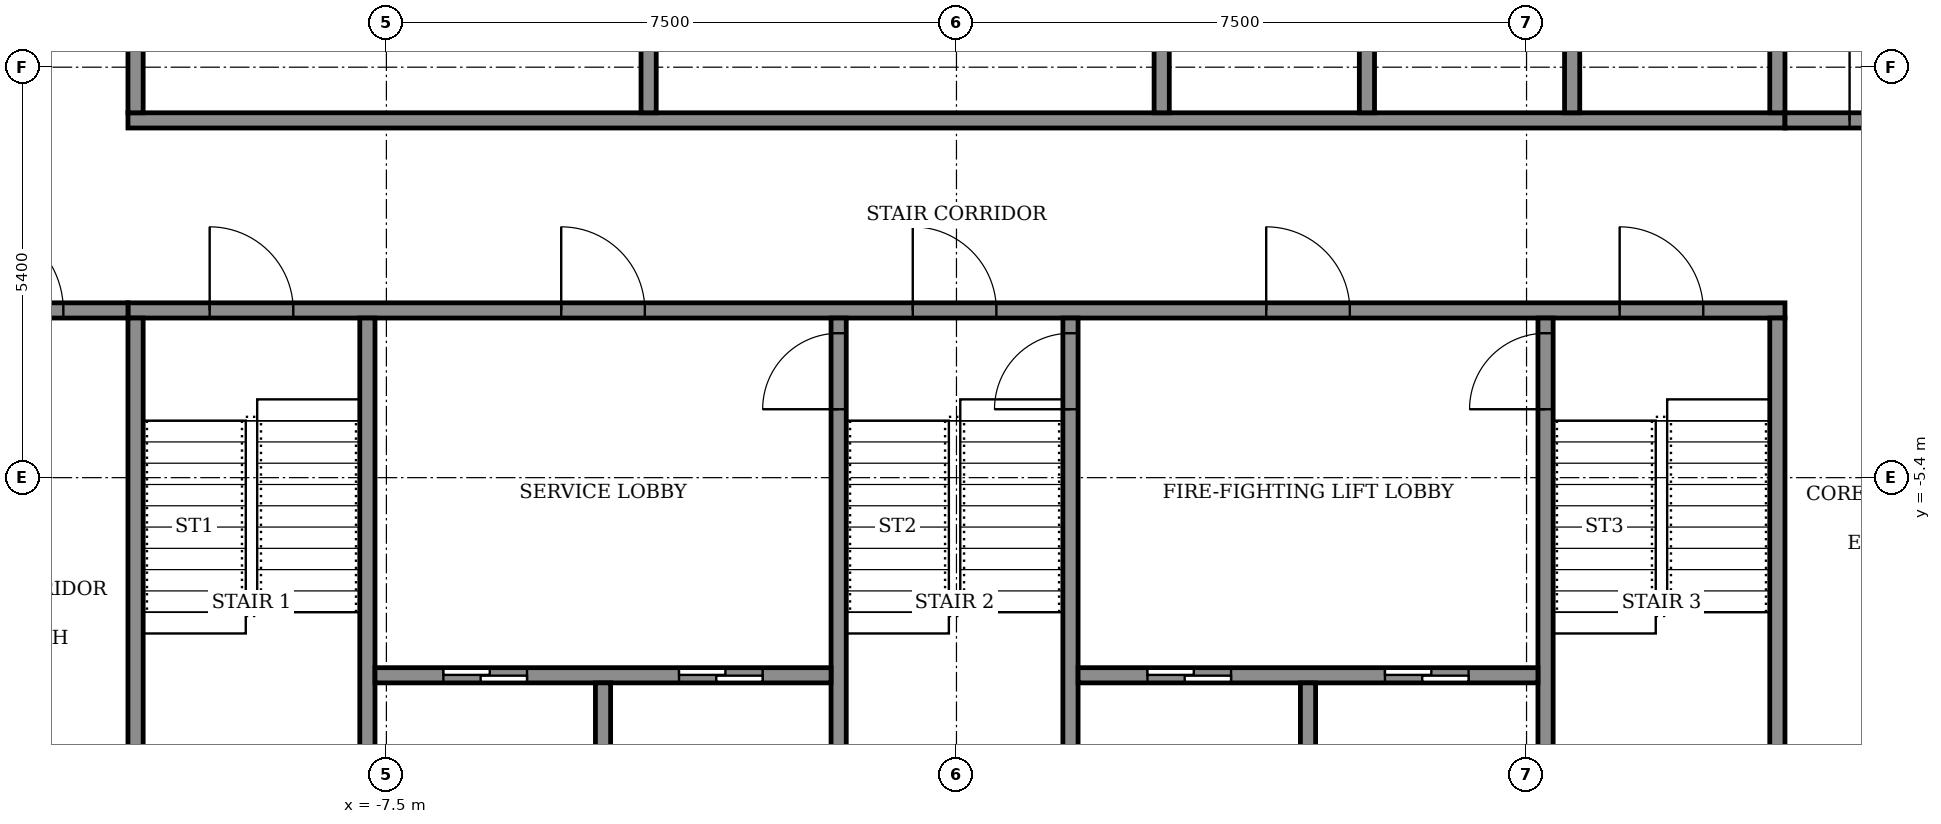
"""IFC4 building model, lengths in metres.
Left out: names, types, materials, properties, quantities, classifications, styles, units other than length and angle.
Written with IfcOpenShell. Run it as: python <this file> out.ifc"""

import sys

from ifc_helpers import new_model, si_unit, direction, frame, frame_2d, origin, place, context, subcontext, project, spatial, rectangle, extrude, element, fill, save


model = new_model("IFC4")
c1 = context("Model", 3, precision=1e-05, world=origin(), true_north=direction((0.0, 1.0)))
c2 = subcontext(c1, "Body", "Model", "MODEL_VIEW")
j1 = project(units=[si_unit("LENGTHUNIT", "METRE"), si_unit("PLANEANGLEUNIT", "RADIAN")], contexts=[c1])
p1 = place(None, origin())
s1 = spatial("IfcSite", under=j1, at=p1, CompositionType="ELEMENT")
p2 = place(p1, origin())
s2 = spatial("IfcBuilding", under=s1, at=p2, CompositionType="ELEMENT")
p3 = place(p2, frame((0.0, 0.0, 189.7)))
s3 = spatial("IfcBuildingStorey", under=s2, at=p3, CompositionType="ELEMENT", Elevation=189.7)
p4 = place(p3, frame((-10.9, -3.2, 0.0), z_axis=(0.0, 0.0, 1.0), x_axis=(1.0, 0.0, 0.0)))
e1 = element("IfcWall", 1, at=p4, inside=s3, PredefinedType="SHEAR", context=c2, shape_type="SweptSolid", body=[
    extrude(rectangle(XDim=21.8, YDim=0.2, at=frame_2d((10.9, 0.0))), origin(), (0.0, 0.0, 1.0), 3.05),
])
p5 = place(p4, frame((1.075, 0.0, 0.0)))
e2 = element("IfcOpeningElement", 2, at=p5, cuts=e1, PredefinedType="OPENING", context=c2, shape_type="SweptSolid", body=[
    extrude(rectangle(XDim=1.1, YDim=2.1, at=frame_2d((0.55, 1.05))), frame((0.0, 0.11, 0.0), z_axis=(0.0, -1.0, 0.0), x_axis=(1.0, 0.0, 0.0)), (0.0, 0.0, 1.0), 0.22),
])
p6 = place(p4, frame((10.325, 0.0, 0.0)))
e3 = element("IfcOpeningElement", 3, at=p6, cuts=e1, PredefinedType="OPENING", context=c2, shape_type="SweptSolid", body=[
    extrude(rectangle(XDim=1.1, YDim=2.1, at=frame_2d((0.55, 1.05))), frame((0.0, 0.11, 0.0), z_axis=(0.0, -1.0, 0.0), x_axis=(1.0, 0.0, 0.0)), (0.0, 0.0, 1.0), 0.22),
])
p7 = place(p4, frame((19.625, 0.0, 0.0)))
e4 = element("IfcOpeningElement", 4, at=p7, cuts=e1, PredefinedType="OPENING", context=c2, shape_type="SweptSolid", body=[
    extrude(rectangle(XDim=1.1, YDim=2.1, at=frame_2d((0.55, 1.05))), frame((0.0, 0.11, 0.0), z_axis=(0.0, -1.0, 0.0), x_axis=(1.0, 0.0, 0.0)), (0.0, 0.0, 1.0), 0.22),
])
p8 = place(p4, frame((5.7, 0.0, 0.0)))
e5 = element("IfcOpeningElement", 5, at=p8, cuts=e1, PredefinedType="OPENING", context=c2, shape_type="SweptSolid", body=[
    extrude(rectangle(XDim=1.1, YDim=2.1, at=frame_2d((0.55, 1.05))), frame((0.0, 0.11, 0.0), z_axis=(0.0, -1.0, 0.0), x_axis=(1.0, 0.0, 0.0)), (0.0, 0.0, 1.0), 0.22),
])
p9 = place(p4, frame((14.975, 0.0, 0.0)))
e6 = element("IfcOpeningElement", 6, at=p9, cuts=e1, PredefinedType="OPENING", context=c2, shape_type="SweptSolid", body=[
    extrude(rectangle(XDim=1.1, YDim=2.1, at=frame_2d((0.55, 1.05))), frame((0.0, 0.11, 0.0), z_axis=(0.0, -1.0, 0.0), x_axis=(1.0, 0.0, 0.0)), (0.0, 0.0, 1.0), 0.22),
])
p10 = place(p3, frame((-10.9, -0.7, 0.0), z_axis=(0.0, 0.0, 1.0), x_axis=(1.0, 0.0, 0.0)))
e7 = element("IfcWall", 7, at=p10, inside=s3, PredefinedType="SHEAR", context=c2, shape_type="SweptSolid", body=[
    extrude(rectangle(XDim=21.8, YDim=0.2, at=frame_2d((10.9, 0.0))), origin(), (0.0, 0.0, 1.0), 3.05),
])
for number, where, z_axis, x_axis in (
    (8, (-10.8, -10.8, 0.0), (0.0, 0.0, 1.0), (0.0, 1.0, 0.0)),
    (9, (-7.75, -10.8, 0.0), (0.0, 0.0, 1.0), (0.0, 1.0, 0.0)),
):
    element("IfcWall", number, at=place(p3, frame(where, z_axis=z_axis, x_axis=x_axis)), inside=s3, PredefinedType="SHEAR", context=c2, shape_type="SweptSolid", body=[
        extrude(rectangle(XDim=7.5, YDim=0.2, at=frame_2d((3.75, 0.0))), origin(), (0.0, 0.0, 1.0), 3.05),
    ])
p11 = place(p3, frame((-1.55, -10.8, 0.0), z_axis=(0.0, 0.0, 1.0), x_axis=(0.0, 1.0, 0.0)))
e10 = element("IfcWall", 10, at=p11, inside=s3, PredefinedType="SHEAR", context=c2, shape_type="SweptSolid", body=[
    extrude(rectangle(XDim=7.5, YDim=0.2, at=frame_2d((3.75, 0.0))), origin(), (0.0, 0.0, 1.0), 3.05),
])
p12 = place(p11, frame((6.3, 0.0, 0.0)))
e11 = element("IfcOpeningElement", 11, at=p12, cuts=e10, PredefinedType="OPENING", context=c2, shape_type="SweptSolid", body=[
    extrude(rectangle(XDim=1.0, YDim=2.1, at=frame_2d((0.5, 1.05))), frame((0.0, 0.11, 0.0), z_axis=(0.0, -1.0, 0.0), x_axis=(1.0, 0.0, 0.0)), (0.0, 0.0, 1.0), 0.22),
])
p13 = place(p3, frame((1.5, -10.8, 0.0), z_axis=(0.0, 0.0, 1.0), x_axis=(0.0, 1.0, 0.0)))
e12 = element("IfcWall", 12, at=p13, inside=s3, PredefinedType="SHEAR", context=c2, shape_type="SweptSolid", body=[
    extrude(rectangle(XDim=7.5, YDim=0.2, at=frame_2d((3.75, 0.0))), origin(), (0.0, 0.0, 1.0), 3.05),
])
p14 = place(p13, frame((6.3, 0.0, 0.0)))
e13 = element("IfcOpeningElement", 13, at=p14, cuts=e12, PredefinedType="OPENING", context=c2, shape_type="SweptSolid", body=[
    extrude(rectangle(XDim=1.0, YDim=2.1, at=frame_2d((0.5, 1.05))), frame((0.0, 0.11, 0.0), z_axis=(0.0, -1.0, 0.0), x_axis=(1.0, 0.0, 0.0)), (0.0, 0.0, 1.0), 0.22),
])
p15 = place(p3, frame((7.75, -10.8, 0.0), z_axis=(0.0, 0.0, 1.0), x_axis=(0.0, 1.0, 0.0)))
e14 = element("IfcWall", 14, at=p15, inside=s3, PredefinedType="SHEAR", context=c2, shape_type="SweptSolid", body=[
    extrude(rectangle(XDim=7.5, YDim=0.2, at=frame_2d((3.75, 0.0))), origin(), (0.0, 0.0, 1.0), 3.05),
])
p16 = place(p15, frame((6.3, 0.0, 0.0)))
e15 = element("IfcOpeningElement", 15, at=p16, cuts=e14, PredefinedType="OPENING", context=c2, shape_type="SweptSolid", body=[
    extrude(rectangle(XDim=1.0, YDim=2.1, at=frame_2d((0.5, 1.05))), frame((0.0, 0.11, 0.0), z_axis=(0.0, -1.0, 0.0), x_axis=(1.0, 0.0, 0.0)), (0.0, 0.0, 1.0), 0.22),
])
p17 = place(p3, frame((10.8, -10.8, 0.0), z_axis=(0.0, 0.0, 1.0), x_axis=(0.0, 1.0, 0.0)))
e16 = element("IfcWall", 16, at=p17, inside=s3, PredefinedType="SHEAR", context=c2, shape_type="SweptSolid", body=[
    extrude(rectangle(XDim=7.5, YDim=0.2, at=frame_2d((3.75, 0.0))), origin(), (0.0, 0.0, 1.0), 3.05),
])
p18 = place(p3, frame((-7.65, -8.0, 0.0), z_axis=(0.0, 0.0, 1.0), x_axis=(1.0, 0.0, 0.0)))
e17 = element("IfcWall", 17, at=p18, inside=s3, PredefinedType="SHEAR", context=c2, shape_type="SweptSolid", body=[
    extrude(rectangle(XDim=6.0, YDim=0.2, at=frame_2d((3.0, 0.0))), origin(), (0.0, 0.0, 1.0), 3.05),
])
p19 = place(p18, frame((0.9, 0.0, 0.0)))
e18 = element("IfcOpeningElement", 18, at=p19, cuts=e17, PredefinedType="OPENING", context=c2, shape_type="SweptSolid", body=[
    extrude(rectangle(XDim=1.1, YDim=2.1, at=frame_2d((0.55, 1.05))), frame((0.0, 0.11, 0.0), z_axis=(0.0, -1.0, 0.0), x_axis=(1.0, 0.0, 0.0)), (0.0, 0.0, 1.0), 0.22),
])
p20 = place(p18, frame((4.0, 0.0, 0.0)))
e19 = element("IfcOpeningElement", 19, at=p20, cuts=e17, PredefinedType="OPENING", context=c2, shape_type="SweptSolid", body=[
    extrude(rectangle(XDim=1.1, YDim=2.1, at=frame_2d((0.55, 1.05))), frame((0.0, 0.11, 0.0), z_axis=(0.0, -1.0, 0.0), x_axis=(1.0, 0.0, 0.0)), (0.0, 0.0, 1.0), 0.22),
])
p21 = place(p3, frame((-4.65, -10.8, 0.0), z_axis=(0.0, 0.0, 1.0), x_axis=(0.0, 1.0, 0.0)))
e20 = element("IfcWall", 20, at=p21, inside=s3, PredefinedType="SHEAR", context=c2, shape_type="SweptSolid", body=[
    extrude(rectangle(XDim=2.7, YDim=0.2, at=frame_2d((1.35, 0.0))), origin(), (0.0, 0.0, 1.0), 3.05),
])
p22 = place(p3, frame((1.6, -8.0, 0.0), z_axis=(0.0, 0.0, 1.0), x_axis=(1.0, 0.0, 0.0)))
e21 = element("IfcWall", 21, at=p22, inside=s3, PredefinedType="SHEAR", context=c2, shape_type="SweptSolid", body=[
    extrude(rectangle(XDim=6.05, YDim=0.2, at=frame_2d((3.025, 0.0))), origin(), (0.0, 0.0, 1.0), 3.05),
])
p23 = place(p22, frame((0.913, 0.0, 0.0)))
e22 = element("IfcOpeningElement", 22, at=p23, cuts=e21, PredefinedType="OPENING", context=c2, shape_type="SweptSolid", body=[
    extrude(rectangle(XDim=1.1, YDim=2.1, at=frame_2d((0.55, 1.05))), frame((0.0, 0.11, 0.0), z_axis=(0.0, -1.0, 0.0), x_axis=(1.0, 0.0, 0.0)), (0.0, 0.0, 1.0), 0.22),
])
p24 = place(p22, frame((4.038, 0.0, 0.0)))
e23 = element("IfcOpeningElement", 23, at=p24, cuts=e21, PredefinedType="OPENING", context=c2, shape_type="SweptSolid", body=[
    extrude(rectangle(XDim=1.1, YDim=2.1, at=frame_2d((0.55, 1.05))), frame((0.0, 0.11, 0.0), z_axis=(0.0, -1.0, 0.0), x_axis=(1.0, 0.0, 0.0)), (0.0, 0.0, 1.0), 0.22),
])
p25 = place(p3, frame((4.625, -10.8, 0.0), z_axis=(0.0, 0.0, 1.0), x_axis=(0.0, 1.0, 0.0)))
e24 = element("IfcWall", 24, at=p25, inside=s3, PredefinedType="SHEAR", context=c2, shape_type="SweptSolid", body=[
    extrude(rectangle(XDim=2.7, YDim=0.2, at=frame_2d((1.35, 0.0))), origin(), (0.0, 0.0, 1.0), 3.05),
])
for number, where, z_axis, x_axis in (
    (25, (-10.8, -0.6, 0.0), (0.0, 0.0, 1.0), (0.0, 1.0, 0.0)),
    (26, (-4.05, -0.6, 0.0), (0.0, 0.0, 1.0), (0.0, 1.0, 0.0)),
):
    element("IfcWall", number, at=place(p3, frame(where, z_axis=z_axis, x_axis=x_axis)), inside=s3, PredefinedType="STANDARD", context=c2, shape_type="SweptSolid", body=[
        extrude(rectangle(XDim=2.5, YDim=0.2, at=frame_2d((1.25, 0.0))), origin(), (0.0, 0.0, 1.0), 3.05),
    ])
for number, where, z_axis, x_axis in (
    (27, (2.7, -0.6, 0.0), (0.0, 0.0, 1.0), (0.0, 1.0, 0.0)),
    (28, (5.4, -0.6, 0.0), (0.0, 0.0, 1.0), (0.0, 1.0, 0.0)),
    (29, (8.1, -0.6, 0.0), (0.0, 0.0, 1.0), (0.0, 1.0, 0.0)),
    (30, (10.8, -0.6, 0.0), (0.0, 0.0, 1.0), (0.0, 1.0, 0.0)),
):
    element("IfcWall", number, at=place(p3, frame(where, z_axis=z_axis, x_axis=x_axis)), inside=s3, PredefinedType="SHEAR", context=c2, shape_type="SweptSolid", body=[
        extrude(rectangle(XDim=2.5, YDim=0.2, at=frame_2d((1.25, 0.0))), origin(), (0.0, 0.0, 1.0), 3.05),
    ])
p26 = place(p3, frame((-13.8, -3.2, 0.0), z_axis=(0.0, 0.0, 1.0), x_axis=(1.0, 0.0, 0.0)))
e31 = element("IfcWall", 31, at=p26, inside=s3, PredefinedType="STANDARD", context=c2, shape_type="SweptSolid", body=[
    extrude(rectangle(XDim=2.9, YDim=0.2, at=frame_2d((1.45, 0.0))), origin(), (0.0, 0.0, 1.0), 3.05),
])
p27 = place(p26, frame((0.85, 0.0, 0.0)))
e32 = element("IfcOpeningElement", 32, at=p27, cuts=e31, PredefinedType="OPENING", context=c2, shape_type="SweptSolid", body=[
    extrude(rectangle(XDim=1.2, YDim=2.1, at=frame_2d((0.6, 1.05))), frame((0.0, 0.11, 0.0), z_axis=(0.0, -1.0, 0.0), x_axis=(1.0, 0.0, 0.0)), (0.0, 0.0, 1.0), 0.22),
])
p28 = place(p3, frame((10.9, -0.7, 0.0), z_axis=(0.0, 0.0, 1.0), x_axis=(1.0, 0.0, 0.0)))
e33 = element("IfcWall", 33, at=p28, inside=s3, PredefinedType="STANDARD", context=c2, shape_type="SweptSolid", body=[
    extrude(rectangle(XDim=2.9, YDim=0.2, at=frame_2d((1.45, 0.0))), origin(), (0.0, 0.0, 1.0), 3.05),
])
p29 = place(p28, frame((0.85, 0.0, 0.0)))
e34 = element("IfcOpeningElement", 34, at=p29, cuts=e33, PredefinedType="OPENING", context=c2, shape_type="SweptSolid", body=[
    extrude(rectangle(XDim=1.2, YDim=2.1, at=frame_2d((0.6, 1.05))), frame((0.0, 0.11, 0.0), z_axis=(0.0, -1.0, 0.0), x_axis=(1.0, 0.0, 0.0)), (0.0, 0.0, 1.0), 0.22),
])
p30 = place(p23, origin())
e35 = element("IfcDoor", 35, at=p30, inside=s3, OperationType="SLIDING_TO_LEFT", PredefinedType="DOOR", context=c2, shape_type="SweptSolid", body=[
    extrude(rectangle(XDim=1.1, YDim=2.1, at=frame_2d((0.55, 1.05))), frame((0.0, 0.025, 0.0), z_axis=(0.0, -1.0, 0.0), x_axis=(1.0, 0.0, 0.0)), (0.0, 0.0, 1.0), 0.05),
])
fill(e22, e35)
p31 = place(p19, origin())
e36 = element("IfcDoor", 36, at=p31, inside=s3, OperationType="SLIDING_TO_LEFT", PredefinedType="DOOR", context=c2, shape_type="SweptSolid", body=[
    extrude(rectangle(XDim=1.1, YDim=2.1, at=frame_2d((0.55, 1.05))), frame((0.0, 0.025, 0.0), z_axis=(0.0, -1.0, 0.0), x_axis=(1.0, 0.0, 0.0)), (0.0, 0.0, 1.0), 0.05),
])
fill(e18, e36)
p32 = place(p24, origin())
e37 = element("IfcDoor", 37, at=p32, inside=s3, OperationType="SLIDING_TO_LEFT", PredefinedType="DOOR", context=c2, shape_type="SweptSolid", body=[
    extrude(rectangle(XDim=1.1, YDim=2.1, at=frame_2d((0.55, 1.05))), frame((0.0, 0.025, 0.0), z_axis=(0.0, -1.0, 0.0), x_axis=(1.0, 0.0, 0.0)), (0.0, 0.0, 1.0), 0.05),
])
fill(e23, e37)
p33 = place(p20, origin())
e38 = element("IfcDoor", 38, at=p33, inside=s3, OperationType="SLIDING_TO_LEFT", PredefinedType="DOOR", context=c2, shape_type="SweptSolid", body=[
    extrude(rectangle(XDim=1.1, YDim=2.1, at=frame_2d((0.55, 1.05))), frame((0.0, 0.025, 0.0), z_axis=(0.0, -1.0, 0.0), x_axis=(1.0, 0.0, 0.0)), (0.0, 0.0, 1.0), 0.05),
])
fill(e19, e38)
p34 = place(p5, origin())
e39 = element("IfcDoor", 39, at=p34, inside=s3, OperationType="SINGLE_SWING_RIGHT", PredefinedType="DOOR", context=c2, shape_type="SweptSolid", body=[
    extrude(rectangle(XDim=1.1, YDim=2.1, at=frame_2d((0.55, 1.05))), frame((0.0, 0.025, 0.0), z_axis=(0.0, -1.0, 0.0), x_axis=(1.0, 0.0, 0.0)), (0.0, 0.0, 1.0), 0.05),
])
fill(e2, e39)
p35 = place(p6, origin())
e40 = element("IfcDoor", 40, at=p35, inside=s3, OperationType="SINGLE_SWING_RIGHT", PredefinedType="DOOR", context=c2, shape_type="SweptSolid", body=[
    extrude(rectangle(XDim=1.1, YDim=2.1, at=frame_2d((0.55, 1.05))), frame((0.0, 0.025, 0.0), z_axis=(0.0, -1.0, 0.0), x_axis=(1.0, 0.0, 0.0)), (0.0, 0.0, 1.0), 0.05),
])
fill(e3, e40)
p36 = place(p7, origin())
e41 = element("IfcDoor", 41, at=p36, inside=s3, OperationType="SINGLE_SWING_RIGHT", PredefinedType="DOOR", context=c2, shape_type="SweptSolid", body=[
    extrude(rectangle(XDim=1.1, YDim=2.1, at=frame_2d((0.55, 1.05))), frame((0.0, 0.025, 0.0), z_axis=(0.0, -1.0, 0.0), x_axis=(1.0, 0.0, 0.0)), (0.0, 0.0, 1.0), 0.05),
])
fill(e4, e41)
p37 = place(p8, origin())
e42 = element("IfcDoor", 42, at=p37, inside=s3, OperationType="SINGLE_SWING_LEFT", PredefinedType="DOOR", context=c2, shape_type="SweptSolid", body=[
    extrude(rectangle(XDim=1.1, YDim=2.1, at=frame_2d((0.55, 1.05))), frame((0.0, 0.025, 0.0), z_axis=(0.0, -1.0, 0.0), x_axis=(1.0, 0.0, 0.0)), (0.0, 0.0, 1.0), 0.05),
])
fill(e5, e42)
p38 = place(p9, origin())
e43 = element("IfcDoor", 43, at=p38, inside=s3, OperationType="SINGLE_SWING_LEFT", PredefinedType="DOOR", context=c2, shape_type="SweptSolid", body=[
    extrude(rectangle(XDim=1.1, YDim=2.1, at=frame_2d((0.55, 1.05))), frame((0.0, 0.025, 0.0), z_axis=(0.0, -1.0, 0.0), x_axis=(1.0, 0.0, 0.0)), (0.0, 0.0, 1.0), 0.05),
])
fill(e6, e43)
p39 = place(p12, origin())
e44 = element("IfcDoor", 44, at=p39, inside=s3, OperationType="SINGLE_SWING_RIGHT", PredefinedType="DOOR", context=c2, shape_type="SweptSolid", body=[
    extrude(rectangle(XDim=1.0, YDim=2.1, at=frame_2d((0.5, 1.05))), frame((0.0, 0.025, 0.0), z_axis=(0.0, -1.0, 0.0), x_axis=(1.0, 0.0, 0.0)), (0.0, 0.0, 1.0), 0.05),
])
fill(e11, e44)
p40 = place(p14, origin())
e45 = element("IfcDoor", 45, at=p40, inside=s3, OperationType="SINGLE_SWING_RIGHT", PredefinedType="DOOR", context=c2, shape_type="SweptSolid", body=[
    extrude(rectangle(XDim=1.0, YDim=2.1, at=frame_2d((0.5, 1.05))), frame((0.0, 0.025, 0.0), z_axis=(0.0, -1.0, 0.0), x_axis=(1.0, 0.0, 0.0)), (0.0, 0.0, 1.0), 0.05),
])
fill(e13, e45)
p41 = place(p16, origin())
e46 = element("IfcDoor", 46, at=p41, inside=s3, OperationType="SINGLE_SWING_RIGHT", PredefinedType="DOOR", context=c2, shape_type="SweptSolid", body=[
    extrude(rectangle(XDim=1.0, YDim=2.1, at=frame_2d((0.5, 1.05))), frame((0.0, 0.025, 0.0), z_axis=(0.0, -1.0, 0.0), x_axis=(1.0, 0.0, 0.0)), (0.0, 0.0, 1.0), 0.05),
])
fill(e15, e46)
p42 = place(p27, origin())
e47 = element("IfcDoor", 47, at=p42, inside=s3, OperationType="SINGLE_SWING_LEFT", PredefinedType="DOOR", context=c2, shape_type="SweptSolid", body=[
    extrude(rectangle(XDim=1.2, YDim=2.1, at=frame_2d((0.6, 1.05))), frame((0.0, 0.025, 0.0), z_axis=(0.0, -1.0, 0.0), x_axis=(1.0, 0.0, 0.0)), (0.0, 0.0, 1.0), 0.05),
])
fill(e32, e47)
p43 = place(p29, origin())
e48 = element("IfcDoor", 48, at=p43, inside=s3, OperationType="SINGLE_SWING_LEFT", PredefinedType="DOOR", context=c2, shape_type="SweptSolid", body=[
    extrude(rectangle(XDim=1.2, YDim=2.1, at=frame_2d((0.6, 1.05))), frame((0.0, 0.025, 0.0), z_axis=(0.0, -1.0, 0.0), x_axis=(1.0, 0.0, 0.0)), (0.0, 0.0, 1.0), 0.05),
])
fill(e34, e48)
save(model, sys.argv[1])
